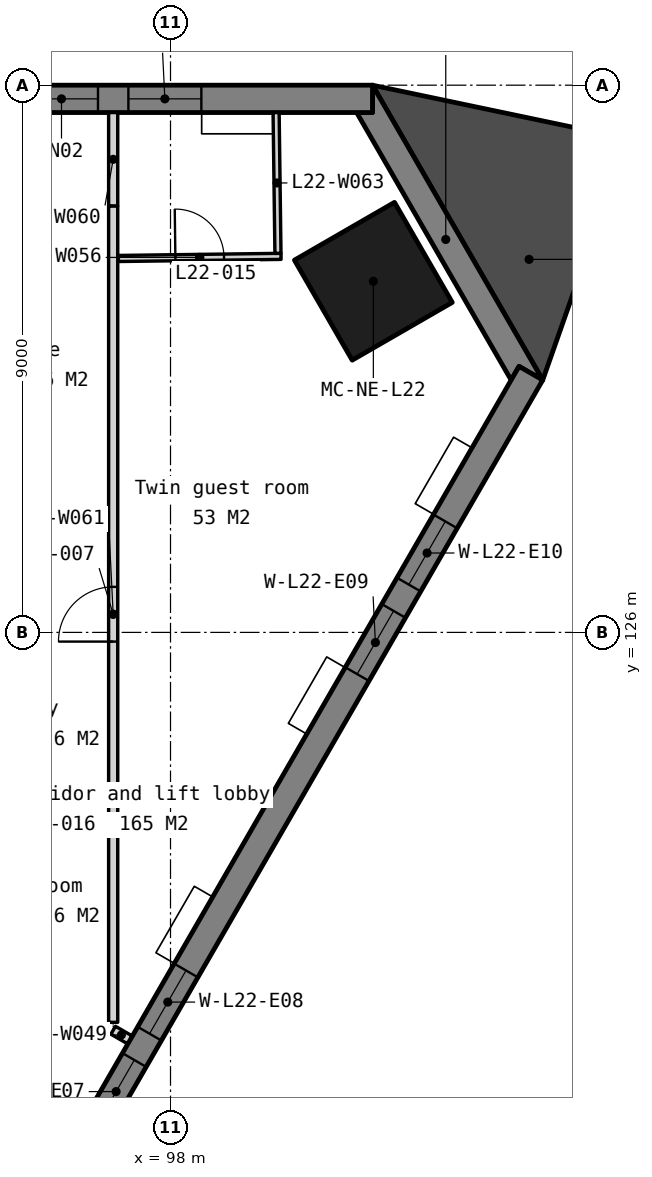
"""IFC4 building model, lengths in metres.
Left out: names, types, materials, properties, quantities, classifications, styles, units other than length and angle.
Written with IfcOpenShell. Run it as: python <this file> out.ifc"""

import sys

from ifc_helpers import new_model, si_unit, direction, frame, frame_2d, origin, origin_2d, place, context, subcontext, project, spatial, polyline, rectangle, outline, extrude, element, fill, save


model = new_model("IFC4")
c1 = context("Model", 3, precision=1e-05, world=origin(), true_north=direction((0.0, 1.0)))
c2 = subcontext(c1, "Body", "Model", "MODEL_VIEW")
j1 = project(units=[si_unit("LENGTHUNIT", "METRE"), si_unit("PLANEANGLEUNIT", "RADIAN")], contexts=[c1])
p1 = place(None, origin())
s1 = spatial("IfcSite", under=j1, at=p1, CompositionType="ELEMENT")
p2 = place(p1, origin())
s2 = spatial("IfcBuilding", under=s1, at=p2, CompositionType="ELEMENT")
p3 = place(p2, frame((0.0, 0.0, 92.3)))
s3 = spatial("IfcBuildingStorey", under=s2, at=p3, CompositionType="ELEMENT", Elevation=92.3)
p4 = place(p3, frame((101.336, 131.775, 0.0), z_axis=(0.0, 0.0, 1.0), x_axis=(-0.5, 0.866025403784, 0.0)))
e1 = element("IfcColumn", 1, at=p4, inside=s3, PredefinedType="COLUMN", context=c2, shape_type="SweptSolid", body=[
    extrude(rectangle(XDim=1.9, YDim=1.9, at=origin_2d()), origin(), (0.0, 0.0, 1.0), 3.5),
])
p5 = place(p3, frame((0.0, 0.0, -0.15)))
e2 = element("IfcWall", 2, at=p5, inside=s3, PredefinedType="SOLIDWALL", context=c2, shape_type="SweptSolid", body=[
    extrude(outline(polyline([(104.122, 130.15), (103.732, 130.375), (103.602, 130.15), (101.062, 134.55), (101.322, 134.55), (101.322, 135.0), (104.122, 130.15)])), origin(), (0.0, 0.0, 1.0), 3.5),
])
p6 = place(p3, frame((101.322, 134.775, -0.15), z_axis=(0.0, 0.0, 1.0), x_axis=(-1.0, 0.0, 0.0)))
e3 = element("IfcWall", 3, at=p6, inside=s3, PredefinedType="SOLIDWALL", context=c2, shape_type="SweptSolid", body=[
    extrude(outline(polyline([(0.0, 0.0), (0.0, 3.5), (36.779, 3.5), (36.779, 0.0), (0.0, 0.0)])), frame((0.0, 0.225, 0.0), z_axis=(0.0, -1.0, 0.0), x_axis=(1.0, 0.0, 0.0)), (0.0, 0.0, 1.0), 0.45),
])
p7 = place(p6, frame((2.814, 0.0, 1.05)))
e4 = element("IfcOpeningElement", 4, at=p7, cuts=e3, PredefinedType="OPENING", context=c2, shape_type="SweptSolid", body=[
    extrude(rectangle(XDim=1.2, YDim=1.5, at=frame_2d((0.6, 0.75))), frame((0.0, 0.235, 0.0), z_axis=(0.0, -1.0, 0.0), x_axis=(1.0, 0.0, 0.0)), (0.0, 0.0, 1.0), 0.47),
])
p8 = place(p6, frame((4.514, 0.0, 1.05)))
e5 = element("IfcOpeningElement", 5, at=p8, cuts=e3, PredefinedType="OPENING", context=c2, shape_type="SweptSolid", body=[
    extrude(rectangle(XDim=1.2, YDim=1.5, at=frame_2d((0.6, 0.75))), frame((0.0, 0.235, 0.0), z_axis=(0.0, -1.0, 0.0), x_axis=(1.0, 0.0, 0.0)), (0.0, 0.0, 1.0), 0.47),
])
p9 = place(p6, frame((11.343, 0.0, 1.05)))
e6 = element("IfcOpeningElement", 6, at=p9, cuts=e3, PredefinedType="OPENING", context=c2, shape_type="SweptSolid", body=[
    extrude(rectangle(XDim=1.2, YDim=1.5, at=frame_2d((0.6, 0.75))), frame((0.0, 0.235, 0.0), z_axis=(0.0, -1.0, 0.0), x_axis=(1.0, 0.0, 0.0)), (0.0, 0.0, 1.0), 0.47),
])
p10 = place(p6, frame((13.043, 0.0, 1.05)))
e7 = element("IfcOpeningElement", 7, at=p10, cuts=e3, PredefinedType="OPENING", context=c2, shape_type="SweptSolid", body=[
    extrude(rectangle(XDim=1.2, YDim=1.5, at=frame_2d((0.6, 0.75))), frame((0.0, 0.235, 0.0), z_axis=(0.0, -1.0, 0.0), x_axis=(1.0, 0.0, 0.0)), (0.0, 0.0, 1.0), 0.47),
])
p11 = place(p6, frame((19.872, 0.0, 1.05)))
e8 = element("IfcOpeningElement", 8, at=p11, cuts=e3, PredefinedType="OPENING", context=c2, shape_type="SweptSolid", body=[
    extrude(rectangle(XDim=1.2, YDim=1.5, at=frame_2d((0.6, 0.75))), frame((0.0, 0.235, 0.0), z_axis=(0.0, -1.0, 0.0), x_axis=(1.0, 0.0, 0.0)), (0.0, 0.0, 1.0), 0.47),
])
p12 = place(p6, frame((21.572, 0.0, 1.05)))
e9 = element("IfcOpeningElement", 9, at=p12, cuts=e3, PredefinedType="OPENING", context=c2, shape_type="SweptSolid", body=[
    extrude(rectangle(XDim=1.2, YDim=1.5, at=frame_2d((0.6, 0.75))), frame((0.0, 0.235, 0.0), z_axis=(0.0, -1.0, 0.0), x_axis=(1.0, 0.0, 0.0)), (0.0, 0.0, 1.0), 0.47),
])
p13 = place(p6, frame((28.4, 0.0, 1.05)))
e10 = element("IfcOpeningElement", 10, at=p13, cuts=e3, PredefinedType="OPENING", context=c2, shape_type="SweptSolid", body=[
    extrude(rectangle(XDim=1.2, YDim=1.5, at=frame_2d((0.6, 0.75))), frame((0.0, 0.235, 0.0), z_axis=(0.0, -1.0, 0.0), x_axis=(1.0, 0.0, 0.0)), (0.0, 0.0, 1.0), 0.47),
])
p14 = place(p6, frame((30.1, 0.0, 1.05)))
e11 = element("IfcOpeningElement", 11, at=p14, cuts=e3, PredefinedType="OPENING", context=c2, shape_type="SweptSolid", body=[
    extrude(rectangle(XDim=1.2, YDim=1.5, at=frame_2d((0.6, 0.75))), frame((0.0, 0.235, 0.0), z_axis=(0.0, -1.0, 0.0), x_axis=(1.0, 0.0, 0.0)), (0.0, 0.0, 1.0), 0.47),
])
p15 = place(p3, frame((82.605, 93.333, -0.15), z_axis=(0.0, 0.0, 1.0), x_axis=(0.500000478905, 0.866025127289, 0.0)))
e12 = element("IfcWall", 12, at=p15, inside=s3, PredefinedType="SOLIDWALL", context=c2, shape_type="SweptSolid", body=[
    extrude(outline(polyline([(42.643, 0.0), (42.643, 3.5), (0.0, 3.5), (0.0, 0.0), (42.643, 0.0)])), frame((0.0, 0.225, 0.0), z_axis=(0.0, -1.0, 0.0), x_axis=(1.0, 0.0, 0.0)), (0.0, 0.0, 1.0), 0.45),
])
p16 = place(p15, frame((2.814, 0.0, 1.05)))
e13 = element("IfcOpeningElement", 13, at=p16, cuts=e12, PredefinedType="OPENING", context=c2, shape_type="SweptSolid", body=[
    extrude(rectangle(XDim=1.2, YDim=1.5, at=frame_2d((0.6, 0.75))), frame((0.0, 0.235, 0.0), z_axis=(0.0, -1.0, 0.0), x_axis=(1.0, 0.0, 0.0)), (0.0, 0.0, 1.0), 0.47),
])
p17 = place(p15, frame((4.514, 0.0, 1.05)))
e14 = element("IfcOpeningElement", 14, at=p17, cuts=e12, PredefinedType="OPENING", context=c2, shape_type="SweptSolid", body=[
    extrude(rectangle(XDim=1.2, YDim=1.5, at=frame_2d((0.6, 0.75))), frame((0.0, 0.235, 0.0), z_axis=(0.0, -1.0, 0.0), x_axis=(1.0, 0.0, 0.0)), (0.0, 0.0, 1.0), 0.47),
])
p18 = place(p15, frame((11.343, 0.0, 1.05)))
e15 = element("IfcOpeningElement", 15, at=p18, cuts=e12, PredefinedType="OPENING", context=c2, shape_type="SweptSolid", body=[
    extrude(rectangle(XDim=1.2, YDim=1.5, at=frame_2d((0.6, 0.75))), frame((0.0, 0.235, 0.0), z_axis=(0.0, -1.0, 0.0), x_axis=(1.0, 0.0, 0.0)), (0.0, 0.0, 1.0), 0.47),
])
p19 = place(p15, frame((13.043, 0.0, 1.05)))
e16 = element("IfcOpeningElement", 16, at=p19, cuts=e12, PredefinedType="OPENING", context=c2, shape_type="SweptSolid", body=[
    extrude(rectangle(XDim=1.2, YDim=1.5, at=frame_2d((0.6, 0.75))), frame((0.0, 0.235, 0.0), z_axis=(0.0, -1.0, 0.0), x_axis=(1.0, 0.0, 0.0)), (0.0, 0.0, 1.0), 0.47),
])
p20 = place(p15, frame((19.872, 0.0, 1.05)))
e17 = element("IfcOpeningElement", 17, at=p20, cuts=e12, PredefinedType="OPENING", context=c2, shape_type="SweptSolid", body=[
    extrude(rectangle(XDim=1.2, YDim=1.5, at=frame_2d((0.6, 0.75))), frame((0.0, 0.235, 0.0), z_axis=(0.0, -1.0, 0.0), x_axis=(1.0, 0.0, 0.0)), (0.0, 0.0, 1.0), 0.47),
])
p21 = place(p15, frame((21.572, 0.0, 1.05)))
e18 = element("IfcOpeningElement", 18, at=p21, cuts=e12, PredefinedType="OPENING", context=c2, shape_type="SweptSolid", body=[
    extrude(rectangle(XDim=1.2, YDim=1.5, at=frame_2d((0.6, 0.75))), frame((0.0, 0.235, 0.0), z_axis=(0.0, -1.0, 0.0), x_axis=(1.0, 0.0, 0.0)), (0.0, 0.0, 1.0), 0.47),
])
p22 = place(p15, frame((28.4, 0.0, 1.05)))
e19 = element("IfcOpeningElement", 19, at=p22, cuts=e12, PredefinedType="OPENING", context=c2, shape_type="SweptSolid", body=[
    extrude(rectangle(XDim=1.2, YDim=1.5, at=frame_2d((0.6, 0.75))), frame((0.0, 0.235, 0.0), z_axis=(0.0, -1.0, 0.0), x_axis=(1.0, 0.0, 0.0)), (0.0, 0.0, 1.0), 0.47),
])
p23 = place(p15, frame((30.1, 0.0, 1.05)))
e20 = element("IfcOpeningElement", 20, at=p23, cuts=e12, PredefinedType="OPENING", context=c2, shape_type="SweptSolid", body=[
    extrude(rectangle(XDim=1.2, YDim=1.5, at=frame_2d((0.6, 0.75))), frame((0.0, 0.235, 0.0), z_axis=(0.0, -1.0, 0.0), x_axis=(1.0, 0.0, 0.0)), (0.0, 0.0, 1.0), 0.47),
])
p24 = place(p15, frame((36.929, 0.0, 1.05)))
e21 = element("IfcOpeningElement", 21, at=p24, cuts=e12, PredefinedType="OPENING", context=c2, shape_type="SweptSolid", body=[
    extrude(rectangle(XDim=1.2, YDim=1.5, at=frame_2d((0.6, 0.75))), frame((0.0, 0.235, 0.0), z_axis=(0.0, -1.0, 0.0), x_axis=(1.0, 0.0, 0.0)), (0.0, 0.0, 1.0), 0.47),
])
p25 = place(p15, frame((38.629, 0.0, 1.05)))
e22 = element("IfcOpeningElement", 22, at=p25, cuts=e12, PredefinedType="OPENING", context=c2, shape_type="SweptSolid", body=[
    extrude(rectangle(XDim=1.2, YDim=1.5, at=frame_2d((0.6, 0.75))), frame((0.0, 0.235, 0.0), z_axis=(0.0, -1.0, 0.0), x_axis=(1.0, 0.0, 0.0)), (0.0, 0.0, 1.0), 0.47),
])
p26 = place(p3, frame((0.0, 0.0, -0.15)))
e23 = element("IfcWall", 23, at=p26, inside=s3, PredefinedType="SOLIDWALL", context=c2, shape_type="SweptSolid", body=[
    extrude(outline(polyline([(104.122, 130.15), (105.516, 134.12), (101.322, 135.0), (104.122, 130.15)])), origin(), (0.0, 0.0, 1.0), 3.5),
])
p27 = place(p3, frame((97.057, 119.457, 0.0), z_axis=(0.0, 0.0, 1.0), x_axis=(0.866159461733, -0.499767732902, 0.0)))
e24 = element("IfcWall", 24, at=p27, inside=s3, PredefinedType="PARTITIONING", context=c2, shape_type="SweptSolid", body=[
    extrude(rectangle(XDim=0.311, YDim=0.15, at=frame_2d((0.156, 0.0))), origin(), (0.0, 0.0, 1.0), 3.35),
])
p28 = place(p3, frame((97.143, 132.15, 0.0), z_axis=(0.0, 0.0, 1.0), x_axis=(0.999914830804, 0.013051097189, 0.0)))
e25 = element("IfcWall", 25, at=p28, inside=s3, PredefinedType="PARTITIONING", context=c2, shape_type="SweptSolid", body=[
    extrude(rectangle(XDim=2.675, YDim=0.1, at=frame_2d((1.337, 0.0))), origin(), (0.0, 0.0, 1.0), 3.35),
])
p29 = place(p28, frame((0.938, 0.0, 0.0)))
e26 = element("IfcOpeningElement", 26, at=p29, cuts=e25, PredefinedType="OPENING", context=c2, shape_type="SweptSolid", body=[
    extrude(rectangle(XDim=0.8, YDim=2.1, at=frame_2d((0.4, 1.05))), frame((0.0, 0.06, 0.0), z_axis=(0.0, -1.0, 0.0), x_axis=(1.0, 0.0, 0.0)), (0.0, 0.0, 1.0), 0.12),
])
p30 = place(p3, frame((97.057, 133.011, 0.0), z_axis=(0.0, 0.0, 1.0), x_axis=(0.0, 1.0, 0.0)))
e27 = element("IfcWall", 27, at=p30, inside=s3, PredefinedType="PARTITIONING", context=c2, shape_type="SweptSolid", body=[
    extrude(rectangle(XDim=1.539, YDim=0.15, at=frame_2d((0.77, 0.0))), origin(), (0.0, 0.0, 1.0), 3.35),
])
p31 = place(p3, frame((97.057, 119.587, 0.0), z_axis=(0.0, 0.0, 1.0), x_axis=(0.0, 1.0, 0.0)))
e28 = element("IfcWall", 28, at=p31, inside=s3, PredefinedType="PARTITIONING", context=c2, shape_type="SweptSolid", body=[
    extrude(rectangle(XDim=13.424, YDim=0.15, at=frame_2d((6.712, 0.0))), origin(), (0.0, 0.0, 1.0), 3.35),
])
p32 = place(p31, frame((6.262, 0.0, 0.0)))
e29 = element("IfcOpeningElement", 29, at=p32, cuts=e28, PredefinedType="OPENING", context=c2, shape_type="SweptSolid", body=[
    extrude(rectangle(XDim=0.9, YDim=2.1, at=frame_2d((0.45, 1.05))), frame((0.0, 0.085, 0.0), z_axis=(0.0, -1.0, 0.0), x_axis=(1.0, 0.0, 0.0)), (0.0, 0.0, 1.0), 0.17),
])
p33 = place(p3, frame((99.737, 134.55, 0.0), z_axis=(0.0, 0.0, 1.0), x_axis=(0.012965387027, -0.999915945837, 0.0)))
e30 = element("IfcWall", 30, at=p33, inside=s3, PredefinedType="PARTITIONING", context=c2, shape_type="SweptSolid", body=[
    extrude(rectangle(XDim=2.316, YDim=0.1, at=frame_2d((1.158, 0.0))), origin(), (0.0, 0.0, 1.0), 3.35),
])
p34 = place(p7, origin())
e31 = element("IfcWindow", 31, at=p34, inside=s3, PartitioningType="SINGLE_PANEL", PredefinedType="WINDOW", context=c2, shape_type="SweptSolid", body=[
    extrude(rectangle(XDim=1.2, YDim=1.5, at=frame_2d((0.6, 0.75))), frame((0.0, 0.03, 0.0), z_axis=(0.0, -1.0, 0.0), x_axis=(1.0, 0.0, 0.0)), (0.0, 0.0, 1.0), 0.06),
])
fill(e4, e31)
p35 = place(p8, origin())
e32 = element("IfcWindow", 32, at=p35, inside=s3, PartitioningType="SINGLE_PANEL", PredefinedType="WINDOW", context=c2, shape_type="SweptSolid", body=[
    extrude(rectangle(XDim=1.2, YDim=1.5, at=frame_2d((0.6, 0.75))), frame((0.0, 0.03, 0.0), z_axis=(0.0, -1.0, 0.0), x_axis=(1.0, 0.0, 0.0)), (0.0, 0.0, 1.0), 0.06),
])
fill(e5, e32)
p36 = place(p22, origin())
e33 = element("IfcWindow", 33, at=p36, inside=s3, PartitioningType="SINGLE_PANEL", PredefinedType="WINDOW", context=c2, shape_type="SweptSolid", body=[
    extrude(rectangle(XDim=1.2, YDim=1.5, at=frame_2d((0.6, 0.75))), frame((0.0, 0.03, 0.0), z_axis=(0.0, -1.0, 0.0), x_axis=(1.0, 0.0, 0.0)), (0.0, 0.0, 1.0), 0.06),
])
fill(e19, e33)
p37 = place(p23, origin())
e34 = element("IfcWindow", 34, at=p37, inside=s3, PartitioningType="SINGLE_PANEL", PredefinedType="WINDOW", context=c2, shape_type="SweptSolid", body=[
    extrude(rectangle(XDim=1.2, YDim=1.5, at=frame_2d((0.6, 0.75))), frame((0.0, 0.03, 0.0), z_axis=(0.0, -1.0, 0.0), x_axis=(1.0, 0.0, 0.0)), (0.0, 0.0, 1.0), 0.06),
])
fill(e20, e34)
p38 = place(p24, origin())
e35 = element("IfcWindow", 35, at=p38, inside=s3, PartitioningType="SINGLE_PANEL", PredefinedType="WINDOW", context=c2, shape_type="SweptSolid", body=[
    extrude(rectangle(XDim=1.2, YDim=1.5, at=frame_2d((0.6, 0.75))), frame((0.0, 0.03, 0.0), z_axis=(0.0, -1.0, 0.0), x_axis=(1.0, 0.0, 0.0)), (0.0, 0.0, 1.0), 0.06),
])
fill(e21, e35)
p39 = place(p25, origin())
e36 = element("IfcWindow", 36, at=p39, inside=s3, PartitioningType="SINGLE_PANEL", PredefinedType="WINDOW", context=c2, shape_type="SweptSolid", body=[
    extrude(rectangle(XDim=1.2, YDim=1.5, at=frame_2d((0.6, 0.75))), frame((0.0, 0.03, 0.0), z_axis=(0.0, -1.0, 0.0), x_axis=(1.0, 0.0, 0.0)), (0.0, 0.0, 1.0), 0.06),
])
fill(e22, e36)
p40 = place(p32, origin())
e37 = element("IfcDoor", 37, at=p40, inside=s3, OperationType="SINGLE_SWING_LEFT", PredefinedType="DOOR", context=c2, shape_type="SweptSolid", body=[
    extrude(rectangle(XDim=0.9, YDim=2.1, at=frame_2d((0.45, 1.05))), frame((0.0, 0.025, 0.0), z_axis=(0.0, -1.0, 0.0), x_axis=(1.0, 0.0, 0.0)), (0.0, 0.0, 1.0), 0.05),
])
fill(e29, e37)
p41 = place(p29, origin())
e38 = element("IfcDoor", 38, at=p41, inside=s3, OperationType="SINGLE_SWING_LEFT", PredefinedType="DOOR", context=c2, shape_type="SweptSolid", body=[
    extrude(rectangle(XDim=0.8, YDim=2.1, at=frame_2d((0.4, 1.05))), frame((0.0, 0.025, 0.0), z_axis=(0.0, -1.0, 0.0), x_axis=(1.0, 0.0, 0.0)), (0.0, 0.0, 1.0), 0.05),
])
fill(e26, e38)
save(model, sys.argv[1])
